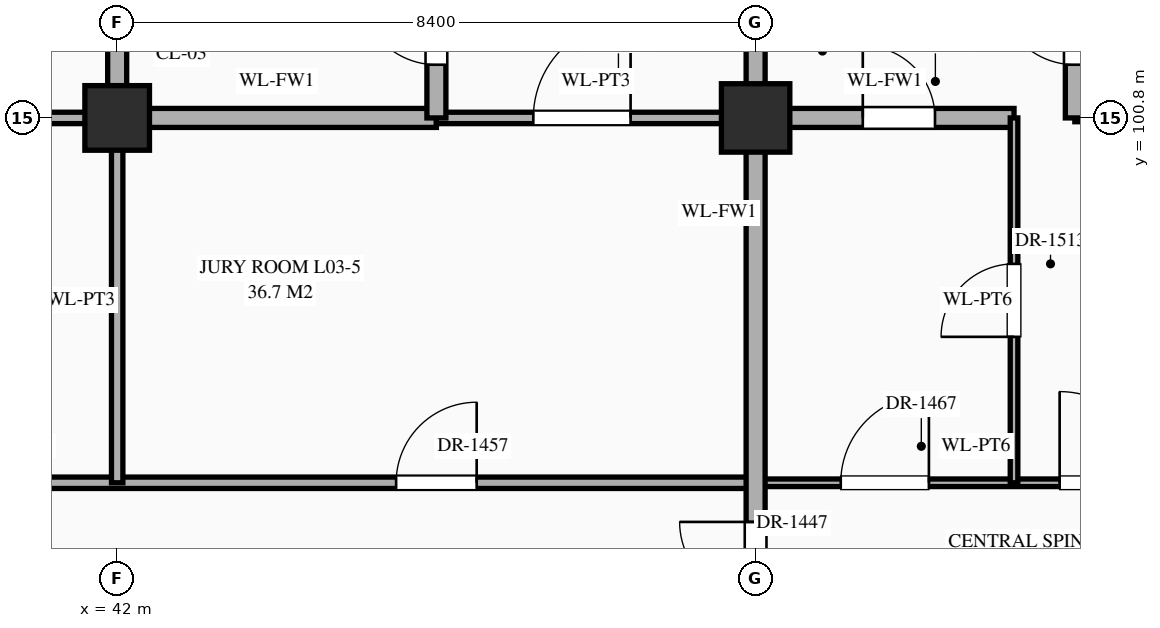
"""IFC4 building model, lengths in metres.
Left out: names, types, materials, properties, quantities, classifications, styles, units other than length and angle.
Written with IfcOpenShell. Run it as: python <this file> out.ifc"""

import sys

from ifc_helpers import new_model, si_unit, direction, frame, frame_2d, origin, origin_2d, place, context, subcontext, project, spatial, rectangle, extrude, element, fill, save


model = new_model("IFC4")
c1 = context("Model", 3, precision=1e-05, world=origin(), true_north=direction((0.0, 1.0)))
c2 = subcontext(c1, "Body", "Model", "MODEL_VIEW")
j1 = project(units=[si_unit("LENGTHUNIT", "METRE"), si_unit("PLANEANGLEUNIT", "RADIAN")], contexts=[c1])
p1 = place(None, origin())
s1 = spatial("IfcSite", under=j1, at=p1, CompositionType="ELEMENT")
p2 = place(p1, origin())
s2 = spatial("IfcBuilding", under=s1, at=p2, CompositionType="ELEMENT")
p3 = place(p2, frame((0.0, 0.0, 10.8)))
s3 = spatial("IfcBuildingStorey", under=s2, at=p3, CompositionType="ELEMENT", Elevation=10.8)
p4 = place(p3, frame((42.0, 100.8, 0.0), z_axis=(0.0, 0.0, 1.0), x_axis=(1.0, 0.0, 0.0)))
e1 = element("IfcColumn", 1, at=p4, inside=s3, PredefinedType="COLUMN", context=c2, shape_type="SweptSolid", body=[
    extrude(rectangle(XDim=0.85, YDim=0.85, at=origin_2d()), origin(), (0.0, 0.0, 1.0), 5.4),
])
p5 = place(p3, frame((50.4, 100.8, 0.0), z_axis=(0.0, 0.0, 1.0), x_axis=(1.0, 0.0, 0.0)))
e2 = element("IfcColumn", 2, at=p5, inside=s3, PredefinedType="COLUMN", context=c2, shape_type="SweptSolid", body=[
    extrude(rectangle(XDim=0.9, YDim=0.9, at=origin_2d()), origin(), (0.0, 0.0, 1.0), 5.4),
])
p6 = place(p3, frame((31.0, 96.0, 0.0), z_axis=(0.0, 0.0, 1.0), x_axis=(1.0, 0.0, 0.0)))
e3 = element("IfcWall", 3, at=p6, inside=s3, PredefinedType="STANDARD", context=c2, shape_type="SweptSolid", body=[
    extrude(rectangle(XDim=19.4, YDim=0.15, at=frame_2d((9.7, 0.0))), origin(), (0.0, 0.0, 1.0), 5.12),
])
p7 = place(p6, frame((0.81, 0.0, 0.0)))
e4 = element("IfcOpeningElement", 4, at=p7, cuts=e3, PredefinedType="OPENING", context=c2, shape_type="SweptSolid", body=[
    extrude(rectangle(XDim=0.98, YDim=2.35, at=frame_2d((0.49, 1.175))), frame((0.0, 0.087, 0.0), z_axis=(0.0, -1.0, 0.0), x_axis=(1.0, 0.0, 0.0)), (0.0, 0.0, 1.0), 0.174),
])
p8 = place(p6, frame((6.29, 0.0, 0.0)))
e5 = element("IfcOpeningElement", 5, at=p8, cuts=e3, PredefinedType="OPENING", context=c2, shape_type="SweptSolid", body=[
    extrude(rectangle(XDim=1.02, YDim=2.4, at=frame_2d((0.51, 1.2))), frame((0.0, 0.087, 0.0), z_axis=(0.0, -1.0, 0.0), x_axis=(1.0, 0.0, 0.0)), (0.0, 0.0, 1.0), 0.174),
])
p9 = place(p6, frame((14.67, 0.0, 0.0)))
e6 = element("IfcOpeningElement", 6, at=p9, cuts=e3, PredefinedType="OPENING", context=c2, shape_type="SweptSolid", body=[
    extrude(rectangle(XDim=1.06, YDim=2.4, at=frame_2d((0.53, 1.2))), frame((0.0, 0.087, 0.0), z_axis=(0.0, -1.0, 0.0), x_axis=(1.0, 0.0, 0.0)), (0.0, 0.0, 1.0), 0.174),
])
p10 = place(p3, frame((50.4, 96.0, 0.0), z_axis=(0.0, 0.0, 1.0), x_axis=(1.0, 0.0, 0.0)))
e7 = element("IfcWall", 7, at=p10, inside=s3, PredefinedType="STANDARD", context=c2, shape_type="SweptSolid", body=[
    extrude(rectangle(XDim=5.8, YDim=0.1, at=frame_2d((2.9, 0.0))), origin(), (0.0, 0.0, 1.0), 5.12),
])
p11 = place(p10, frame((1.12, 0.0, 0.0)))
e8 = element("IfcOpeningElement", 8, at=p11, cuts=e7, PredefinedType="OPENING", context=c2, shape_type="SweptSolid", body=[
    extrude(rectangle(XDim=1.16, YDim=2.3, at=frame_2d((0.58, 1.15))), frame((0.0, 0.062, 0.0), z_axis=(0.0, -1.0, 0.0), x_axis=(1.0, 0.0, 0.0)), (0.0, 0.0, 1.0), 0.124),
])
p12 = place(p10, frame((4.0, 0.0, 0.0)))
e9 = element("IfcOpeningElement", 9, at=p12, cuts=e7, PredefinedType="OPENING", context=c2, shape_type="SweptSolid", body=[
    extrude(rectangle(XDim=1.2, YDim=2.35, at=frame_2d((0.6, 1.175))), frame((0.0, 0.062, 0.0), z_axis=(0.0, -1.0, 0.0), x_axis=(1.0, 0.0, 0.0)), (0.0, 0.0, 1.0), 0.124),
])
p13 = place(p3, frame((31.0, 100.8, 0.0), z_axis=(0.0, 0.0, 1.0), x_axis=(1.0, 0.0, 0.0)))
e10 = element("IfcWall", 10, at=p13, inside=s3, PredefinedType="STANDARD", context=c2, shape_type="SweptSolid", body=[
    extrude(rectangle(XDim=11.0, YDim=0.15, at=frame_2d((5.5, 0.0))), origin(), (0.0, 0.0, 1.0), 4.27),
])
p14 = place(p13, frame((0.698, 0.0, 0.0)))
e11 = element("IfcOpeningElement", 11, at=p14, cuts=e10, PredefinedType="OPENING", context=c2, shape_type="SweptSolid", body=[
    extrude(rectangle(XDim=0.86, YDim=2.1, at=frame_2d((0.43, 1.05))), frame((0.0, 0.087, 0.0), z_axis=(0.0, -1.0, 0.0), x_axis=(1.0, 0.0, 0.0)), (0.0, 0.0, 1.0), 0.174),
])
p15 = place(p13, frame((6.34, 0.0, 0.0)))
e12 = element("IfcOpeningElement", 12, at=p15, cuts=e10, PredefinedType="OPENING", context=c2, shape_type="SweptSolid", body=[
    extrude(rectangle(XDim=0.92, YDim=2.15, at=frame_2d((0.46, 1.075))), frame((0.0, 0.087, 0.0), z_axis=(0.0, -1.0, 0.0), x_axis=(1.0, 0.0, 0.0)), (0.0, 0.0, 1.0), 0.174),
])
p16 = place(p3, frame((42.0, 100.8, 0.0), z_axis=(0.0, 0.0, 1.0), x_axis=(1.0, 0.0, 0.0)))
e13 = element("IfcWall", 13, at=p16, inside=s3, PredefinedType="STANDARD", context=c2, shape_type="SweptSolid", body=[
    extrude(rectangle(XDim=4.2, YDim=0.25, at=frame_2d((2.1, 0.0))), origin(), (0.0, 0.0, 1.0), 4.27),
])
p17 = place(p3, frame((46.2, 100.8, 0.0), z_axis=(0.0, 0.0, 1.0), x_axis=(1.0, 0.0, 0.0)))
e14 = element("IfcWall", 14, at=p17, inside=s3, PredefinedType="STANDARD", context=c2, shape_type="SweptSolid", body=[
    extrude(rectangle(XDim=4.2, YDim=0.15, at=frame_2d((2.1, 0.0))), origin(), (0.0, 0.0, 1.0), 4.27),
])
p18 = place(p17, frame((1.275, 0.0, 0.0)))
e15 = element("IfcOpeningElement", 15, at=p18, cuts=e14, PredefinedType="OPENING", context=c2, shape_type="SweptSolid", body=[
    extrude(rectangle(XDim=1.28, YDim=2.35, at=frame_2d((0.64, 1.175))), frame((0.0, 0.087, 0.0), z_axis=(0.0, -1.0, 0.0), x_axis=(1.0, 0.0, 0.0)), (0.0, 0.0, 1.0), 0.174),
])
p19 = place(p3, frame((50.4, 100.8, 0.0), z_axis=(0.0, 0.0, 1.0), x_axis=(1.0, 0.0, 0.0)))
e16 = element("IfcWall", 16, at=p19, inside=s3, PredefinedType="STANDARD", context=c2, shape_type="SweptSolid", body=[
    extrude(rectangle(XDim=3.4, YDim=0.25, at=frame_2d((1.7, 0.0))), origin(), (0.0, 0.0, 1.0), 4.27),
])
p20 = place(p19, frame((1.41, 0.0, 0.0)))
e17 = element("IfcOpeningElement", 17, at=p20, cuts=e16, PredefinedType="OPENING", context=c2, shape_type="SweptSolid", body=[
    extrude(rectangle(XDim=0.95, YDim=2.15, at=frame_2d((0.475, 1.075))), frame((0.0, 0.137, 0.0), z_axis=(0.0, -1.0, 0.0), x_axis=(1.0, 0.0, 0.0)), (0.0, 0.0, 1.0), 0.274),
])
p21 = place(p3, frame((54.6, 100.8, 0.0), z_axis=(0.0, 0.0, 1.0), x_axis=(1.0, 0.0, 0.0)))
e18 = element("IfcWall", 18, at=p21, inside=s3, PredefinedType="STANDARD", context=c2, shape_type="SweptSolid", body=[
    extrude(rectangle(XDim=1.6, YDim=0.1, at=frame_2d((0.8, 0.0))), origin(), (0.0, 0.0, 1.0), 4.27),
])
p22 = place(p21, frame((0.29, 0.0, 0.0)))
e19 = element("IfcOpeningElement", 19, at=p22, cuts=e18, PredefinedType="OPENING", context=c2, shape_type="SweptSolid", body=[
    extrude(rectangle(XDim=1.02, YDim=2.4, at=frame_2d((0.51, 1.2))), frame((0.0, 0.062, 0.0), z_axis=(0.0, -1.0, 0.0), x_axis=(1.0, 0.0, 0.0)), (0.0, 0.0, 1.0), 0.124),
])
p23 = place(p3, frame((42.0, 96.0, 0.0), z_axis=(0.0, 0.0, 1.0), x_axis=(0.0, 1.0, 0.0)))
e20 = element("IfcWall", 20, at=p23, inside=s3, PredefinedType="STANDARD", context=c2, shape_type="SweptSolid", body=[
    extrude(rectangle(XDim=4.8, YDim=0.15, at=frame_2d((2.4, 0.0))), origin(), (0.0, 0.0, 1.0), 4.37),
])
p24 = place(p3, frame((42.0, 100.8, 0.0), z_axis=(0.0, 0.0, 1.0), x_axis=(0.0, 1.0, 0.0)))
e21 = element("IfcWall", 21, at=p24, inside=s3, PredefinedType="STANDARD", context=c2, shape_type="SweptSolid", body=[
    extrude(rectangle(XDim=3.6, YDim=0.25, at=frame_2d((1.8, 0.0))), origin(), (0.0, 0.0, 1.0), 4.37),
])
p25 = place(p24, frame((0.897, 0.0, 0.0)))
e22 = element("IfcOpeningElement", 22, at=p25, cuts=e21, PredefinedType="OPENING", context=c2, shape_type="SweptSolid", body=[
    extrude(rectangle(XDim=0.95, YDim=2.15, at=frame_2d((0.475, 1.075))), frame((0.0, 0.137, 0.0), z_axis=(0.0, -1.0, 0.0), x_axis=(1.0, 0.0, 0.0)), (0.0, 0.0, 1.0), 0.274),
])
p26 = place(p3, frame((46.2, 100.8, 0.0), z_axis=(0.0, 0.0, 1.0), x_axis=(0.0, 1.0, 0.0)))
e23 = element("IfcWall", 23, at=p26, inside=s3, PredefinedType="STANDARD", context=c2, shape_type="SweptSolid", body=[
    extrude(rectangle(XDim=3.6, YDim=0.25, at=frame_2d((1.8, 0.0))), origin(), (0.0, 0.0, 1.0), 4.72),
])
p27 = place(p26, frame((0.7, 0.0, 0.0)))
e24 = element("IfcOpeningElement", 24, at=p27, cuts=e23, PredefinedType="OPENING", context=c2, shape_type="SweptSolid", body=[
    extrude(rectangle(XDim=1.0, YDim=2.2, at=frame_2d((0.5, 1.1))), frame((0.0, 0.137, 0.0), z_axis=(0.0, -1.0, 0.0), x_axis=(1.0, 0.0, 0.0)), (0.0, 0.0, 1.0), 0.274),
])
p28 = place(p3, frame((50.4, 91.2, 0.0), z_axis=(0.0, 0.0, 1.0), x_axis=(0.0, 1.0, 0.0)))
e25 = element("IfcWall", 25, at=p28, inside=s3, PredefinedType="STANDARD", context=c2, shape_type="SweptSolid", body=[
    extrude(rectangle(XDim=13.2, YDim=0.25, at=frame_2d((6.6, 0.0))), origin(), (0.0, 0.0, 1.0), 4.37),
])
p29 = place(p28, frame((0.465, 0.0, 0.0)))
e26 = element("IfcOpeningElement", 26, at=p29, cuts=e25, PredefinedType="OPENING", context=c2, shape_type="SweptSolid", body=[
    extrude(rectangle(XDim=1.1, YDim=2.2, at=frame_2d((0.55, 1.1))), frame((0.0, 0.137, 0.0), z_axis=(0.0, -1.0, 0.0), x_axis=(1.0, 0.0, 0.0)), (0.0, 0.0, 1.0), 0.274),
])
p30 = place(p28, frame((10.485, 0.0, 0.0)))
e27 = element("IfcOpeningElement", 27, at=p30, cuts=e25, PredefinedType="OPENING", context=c2, shape_type="SweptSolid", body=[
    extrude(rectangle(XDim=1.0, YDim=2.2, at=frame_2d((0.5, 1.1))), frame((0.0, 0.137, 0.0), z_axis=(0.0, -1.0, 0.0), x_axis=(1.0, 0.0, 0.0)), (0.0, 0.0, 1.0), 0.274),
])
p31 = place(p28, frame((3.285, 0.0, 0.0)))
e28 = element("IfcOpeningElement", 28, at=p31, cuts=e25, PredefinedType="OPENING", context=c2, shape_type="SweptSolid", body=[
    extrude(rectangle(XDim=1.0, YDim=2.2, at=frame_2d((0.5, 1.1))), frame((0.0, 0.137, 0.0), z_axis=(0.0, -1.0, 0.0), x_axis=(1.0, 0.0, 0.0)), (0.0, 0.0, 1.0), 0.274),
])
p32 = place(p3, frame((53.8, 96.0, 0.0), z_axis=(0.0, 0.0, 1.0), x_axis=(0.0, 1.0, 0.0)))
e29 = element("IfcWall", 29, at=p32, inside=s3, PredefinedType="STANDARD", context=c2, shape_type="SweptSolid", body=[
    extrude(rectangle(XDim=4.8, YDim=0.1, at=frame_2d((2.4, 0.0))), origin(), (0.0, 0.0, 1.0), 5.12),
])
p33 = place(p32, frame((1.92, 0.0, 0.0)))
e30 = element("IfcOpeningElement", 30, at=p33, cuts=e29, PredefinedType="OPENING", context=c2, shape_type="SweptSolid", body=[
    extrude(rectangle(XDim=0.96, YDim=2.2, at=frame_2d((0.48, 1.1))), frame((0.0, 0.062, 0.0), z_axis=(0.0, -1.0, 0.0), x_axis=(1.0, 0.0, 0.0)), (0.0, 0.0, 1.0), 0.124),
])
p34 = place(p3, frame((54.6, 100.8, 0.0), z_axis=(0.0, 0.0, 1.0), x_axis=(0.0, 1.0, 0.0)))
e31 = element("IfcWall", 31, at=p34, inside=s3, PredefinedType="STANDARD", context=c2, shape_type="SweptSolid", body=[
    extrude(rectangle(XDim=3.6, YDim=0.25, at=frame_2d((1.8, 0.0))), origin(), (0.0, 0.0, 1.0), 4.57),
])
p35 = place(p34, frame((0.7, 0.0, 0.0)))
e32 = element("IfcOpeningElement", 32, at=p35, cuts=e31, PredefinedType="OPENING", context=c2, shape_type="SweptSolid", body=[
    extrude(rectangle(XDim=1.0, YDim=2.2, at=frame_2d((0.5, 1.1))), frame((0.0, 0.137, 0.0), z_axis=(0.0, -1.0, 0.0), x_axis=(1.0, 0.0, 0.0)), (0.0, 0.0, 1.0), 0.274),
])
p36 = place(p27, origin())
e33 = element("IfcDoor", 33, at=p36, inside=s3, OperationType="SINGLE_SWING_RIGHT", PredefinedType="DOOR", context=c2, shape_type="SweptSolid", body=[
    extrude(rectangle(XDim=1.0, YDim=2.2, at=frame_2d((0.5, 1.1))), frame((0.0, 0.025, 0.0), z_axis=(0.0, -1.0, 0.0), x_axis=(1.0, 0.0, 0.0)), (0.0, 0.0, 1.0), 0.05),
])
fill(e24, e33)
p37 = place(p18, origin())
e34 = element("IfcDoor", 34, at=p37, inside=s3, OperationType="SINGLE_SWING_RIGHT", PredefinedType="DOOR", context=c2, shape_type="SweptSolid", body=[
    extrude(rectangle(XDim=1.28, YDim=2.35, at=frame_2d((0.64, 1.175))), frame((0.0, 0.025, 0.0), z_axis=(0.0, -1.0, 0.0), x_axis=(1.0, 0.0, 0.0)), (0.0, 0.0, 1.0), 0.05),
])
fill(e15, e34)
p38 = place(p35, origin())
e35 = element("IfcDoor", 35, at=p38, inside=s3, OperationType="SINGLE_SWING_RIGHT", PredefinedType="DOOR", context=c2, shape_type="SweptSolid", body=[
    extrude(rectangle(XDim=1.0, YDim=2.2, at=frame_2d((0.5, 1.1))), frame((0.0, 0.025, 0.0), z_axis=(0.0, -1.0, 0.0), x_axis=(1.0, 0.0, 0.0)), (0.0, 0.0, 1.0), 0.05),
])
fill(e32, e35)
p39 = place(p20, origin())
e36 = element("IfcDoor", 36, at=p39, inside=s3, OperationType="SINGLE_SWING_LEFT", PredefinedType="DOOR", context=c2, shape_type="SweptSolid", body=[
    extrude(rectangle(XDim=0.95, YDim=2.15, at=frame_2d((0.475, 1.075))), frame((0.0, 0.025, 0.0), z_axis=(0.0, -1.0, 0.0), x_axis=(1.0, 0.0, 0.0)), (0.0, 0.0, 1.0), 0.05),
])
fill(e17, e36)
p40 = place(p31, origin())
e37 = element("IfcDoor", 37, at=p40, inside=s3, OperationType="SINGLE_SWING_RIGHT", PredefinedType="DOOR", context=c2, shape_type="SweptSolid", body=[
    extrude(rectangle(XDim=1.0, YDim=2.2, at=frame_2d((0.5, 1.1))), frame((0.0, 0.025, 0.0), z_axis=(0.0, -1.0, 0.0), x_axis=(1.0, 0.0, 0.0)), (0.0, 0.0, 1.0), 0.05),
])
fill(e28, e37)
p41 = place(p9, origin())
e38 = element("IfcDoor", 38, at=p41, inside=s3, OperationType="SINGLE_SWING_RIGHT", PredefinedType="DOOR", context=c2, shape_type="SweptSolid", body=[
    extrude(rectangle(XDim=1.06, YDim=2.4, at=frame_2d((0.53, 1.2))), frame((0.0, 0.025, 0.0), z_axis=(0.0, -1.0, 0.0), x_axis=(1.0, 0.0, 0.0)), (0.0, 0.0, 1.0), 0.05),
])
fill(e6, e38)
p42 = place(p11, origin())
e39 = element("IfcDoor", 39, at=p42, inside=s3, OperationType="SINGLE_SWING_RIGHT", PredefinedType="DOOR", context=c2, shape_type="SweptSolid", body=[
    extrude(rectangle(XDim=1.16, YDim=2.3, at=frame_2d((0.58, 1.15))), frame((0.0, 0.025, 0.0), z_axis=(0.0, -1.0, 0.0), x_axis=(1.0, 0.0, 0.0)), (0.0, 0.0, 1.0), 0.05),
])
fill(e8, e39)
p43 = place(p12, origin())
e40 = element("IfcDoor", 40, at=p43, inside=s3, OperationType="SINGLE_SWING_LEFT", PredefinedType="DOOR", context=c2, shape_type="SweptSolid", body=[
    extrude(rectangle(XDim=1.2, YDim=2.35, at=frame_2d((0.6, 1.175))), frame((0.0, 0.025, 0.0), z_axis=(0.0, -1.0, 0.0), x_axis=(1.0, 0.0, 0.0)), (0.0, 0.0, 1.0), 0.05),
])
fill(e9, e40)
p44 = place(p33, origin())
e41 = element("IfcDoor", 41, at=p44, inside=s3, OperationType="SINGLE_SWING_LEFT", PredefinedType="DOOR", context=c2, shape_type="SweptSolid", body=[
    extrude(rectangle(XDim=0.96, YDim=2.2, at=frame_2d((0.48, 1.1))), frame((0.0, 0.025, 0.0), z_axis=(0.0, -1.0, 0.0), x_axis=(1.0, 0.0, 0.0)), (0.0, 0.0, 1.0), 0.05),
])
fill(e30, e41)
save(model, sys.argv[1])
